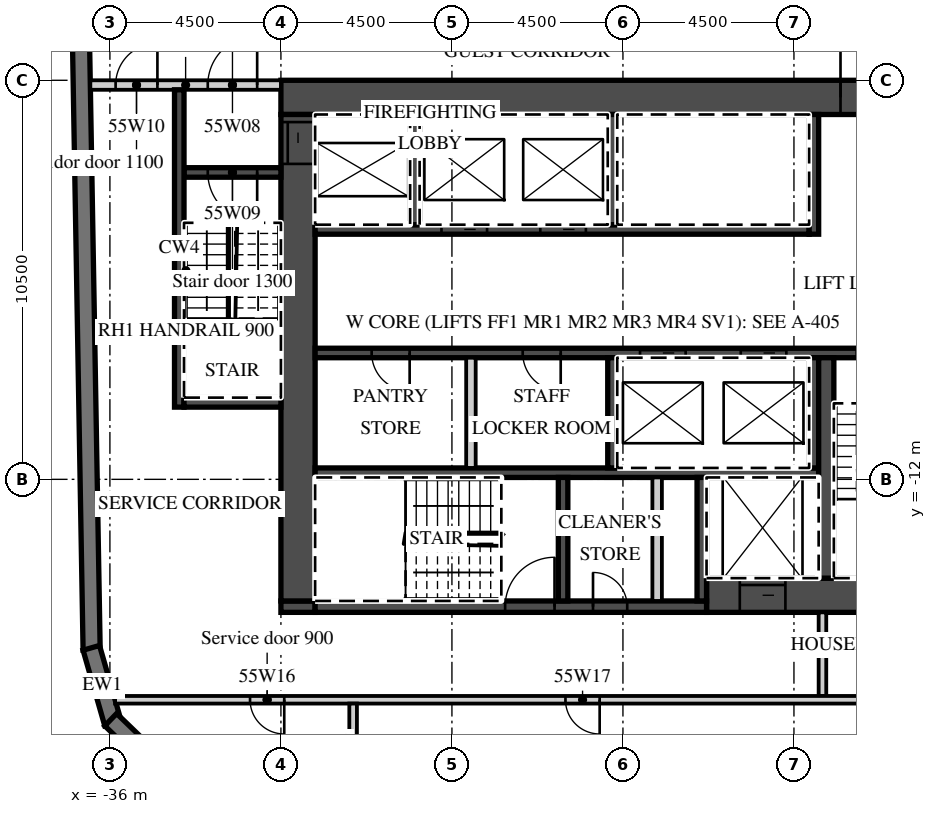
"""IFC4 building model, lengths in metres.
Left out: names, types, materials, properties, quantities, classifications, styles, units other than length and angle.
Written with IfcOpenShell. Run it as: python <this file> out.ifc"""

import sys

from ifc_helpers import new_model, si_unit, direction, frame, frame_2d, origin, place, context, subcontext, project, spatial, polyline, rectangle, outline, extrude, element, fill, save


model = new_model("IFC4")
c1 = context("Model", 3, precision=1e-05, world=origin(), true_north=direction((0.0, 1.0)))
c2 = subcontext(c1, "Body", "Model", "MODEL_VIEW")
j1 = project(units=[si_unit("LENGTHUNIT", "METRE"), si_unit("PLANEANGLEUNIT", "RADIAN")], contexts=[c1])
p1 = place(None, origin())
s1 = spatial("IfcSite", under=j1, at=p1, CompositionType="ELEMENT")
p2 = place(p1, origin())
s2 = spatial("IfcBuilding", under=s1, at=p2, CompositionType="ELEMENT")
p3 = place(p2, frame((0.0, 0.0, 227.6)))
s3 = spatial("IfcBuildingStorey", under=s2, at=p3, CompositionType="ELEMENT", Elevation=227.6)
p4 = place(p3, frame((-37.057, 16.503, 0.0), z_axis=(0.0, 0.0, 1.0), x_axis=(0.017452279857, -0.999847697366, 0.0)))
e1 = element("IfcWall", 1, at=p4, inside=s3, PredefinedType="SOLIDWALL", context=c2, shape_type="SweptSolid", body=[
    extrude(rectangle(XDim=33.0, YDim=0.45, at=frame_2d((16.5, 0.0))), origin(), (0.0, 0.0, 1.0), 3.02),
])
p5 = place(p3, frame((-36.49, -16.434, 0.0), z_axis=(0.0, 0.0, 1.0), x_axis=(0.275577603096, -0.961278827745, 0.0)))
e2 = element("IfcWall", 2, at=p5, inside=s3, PredefinedType="SOLIDWALL", context=c2, shape_type="SweptSolid", body=[
    extrude(outline(polyline([(0.0, -0.225), (2.071, -0.225), (1.95, 0.225), (0.121, 0.225), (0.0, -0.225)])), origin(), (0.0, 0.0, 1.0), 3.02),
])
p6 = place(p3, frame((-35.979, -18.324, 0.0), z_axis=(0.0, 0.0, 1.0), x_axis=(0.719320193998, -0.694678672846, 0.0)))
e3 = element("IfcWall", 3, at=p6, inside=s3, PredefinedType="SOLIDWALL", context=c2, shape_type="SweptSolid", body=[
    extrude(outline(polyline([(0.0, -0.225), (2.071, -0.225), (1.95, 0.225), (0.121, 0.225), (0.0, -0.225)])), origin(), (0.0, 0.0, 1.0), 3.02),
])
p7 = place(p3, frame((-31.5, -1.95, 0.0), z_axis=(0.0, 0.0, 1.0), x_axis=(1.0, 0.0, 0.0)))
e4 = element("IfcWall", 4, at=p7, inside=s3, PredefinedType="SHEAR", context=c2, shape_type="SweptSolid", body=[
    extrude(rectangle(XDim=18.0, YDim=0.9, at=frame_2d((9.0, 0.0))), origin(), (0.0, 0.0, 1.0), 3.02),
])
p8 = place(p7, frame((14.725, 0.0, 0.0)))
e5 = element("IfcOpeningElement", 5, at=p8, cuts=e4, PredefinedType="OPENING", context=c2, shape_type="SweptSolid", body=[
    extrude(rectangle(XDim=1.8, YDim=2.1, at=frame_2d((0.9, 1.05))), frame((0.0, 0.46, 0.0), z_axis=(0.0, -1.0, 0.0), x_axis=(1.0, 0.0, 0.0)), (0.0, 0.0, 1.0), 0.92),
])
p9 = place(p3, frame((-20.3, -15.05, 0.0), z_axis=(0.0, 0.0, 1.0), x_axis=(1.0, 0.0, 0.0)))
e6 = element("IfcWall", 6, at=p9, inside=s3, PredefinedType="SHEAR", context=c2, shape_type="SweptSolid", body=[
    extrude(rectangle(XDim=6.8, YDim=0.9, at=frame_2d((3.4, 0.0))), origin(), (0.0, 0.0, 1.0), 3.02),
])
p10 = place(p9, frame((0.875, 0.0, 0.0)))
e7 = element("IfcOpeningElement", 7, at=p10, cuts=e6, PredefinedType="OPENING", context=c2, shape_type="SweptSolid", body=[
    extrude(rectangle(XDim=1.2, YDim=2.1, at=frame_2d((0.6, 1.05))), frame((0.0, 0.46, 0.0), z_axis=(0.0, -1.0, 0.0), x_axis=(1.0, 0.0, 0.0)), (0.0, 0.0, 1.0), 0.92),
])
p11 = place(p3, frame((-31.5, -15.35, 0.0), z_axis=(0.0, 0.0, 1.0), x_axis=(1.0, 0.0, 0.0)))
e8 = element("IfcWall", 8, at=p11, inside=s3, PredefinedType="SHEAR", context=c2, shape_type="SweptSolid", body=[
    extrude(rectangle(XDim=0.9, YDim=0.3, at=frame_2d((0.45, 0.0))), origin(), (0.0, 0.0, 1.0), 3.02),
])
p12 = place(p3, frame((-30.6, -15.35, 0.0), z_axis=(0.0, 0.0, 1.0), x_axis=(1.0, 0.0, 0.0)))
e9 = element("IfcWall", 9, at=p12, inside=s3, PredefinedType="SHEAR", context=c2, shape_type="SweptSolid", body=[
    extrude(rectangle(XDim=10.3, YDim=0.3, at=frame_2d((5.15, 0.0))), origin(), (0.0, 0.0, 1.0), 3.02),
])
p13 = place(p12, frame((5.0, 0.0, 0.0)))
e10 = element("IfcOpeningElement", 10, at=p13, cuts=e9, PredefinedType="OPENING", context=c2, shape_type="SweptSolid", body=[
    extrude(rectangle(XDim=1.3, YDim=2.1, at=frame_2d((0.65, 1.05))), frame((0.0, 0.16, 0.0), z_axis=(0.0, -1.0, 0.0), x_axis=(1.0, 0.0, 0.0)), (0.0, 0.0, 1.0), 0.32),
])
p14 = place(p12, frame((7.312, 0.0, 0.0)))
e11 = element("IfcOpeningElement", 11, at=p14, cuts=e9, PredefinedType="OPENING", context=c2, shape_type="SweptSolid", body=[
    extrude(rectangle(XDim=0.9, YDim=2.1, at=frame_2d((0.45, 1.05))), frame((0.0, 0.16, 0.0), z_axis=(0.0, -1.0, 0.0), x_axis=(1.0, 0.0, 0.0)), (0.0, 0.0, 1.0), 0.32),
])
p15 = place(p3, frame((-31.05, -15.2, 0.0), z_axis=(0.0, 0.0, 1.0), x_axis=(0.0, 1.0, 0.0)))
e12 = element("IfcWall", 12, at=p15, inside=s3, PredefinedType="SHEAR", context=c2, shape_type="SweptSolid", body=[
    extrude(rectangle(XDim=12.8, YDim=0.9, at=frame_2d((6.4, 0.0))), origin(), (0.0, 0.0, 1.0), 3.02),
])
p16 = place(p15, frame((11.5, 0.0, 0.0)))
e13 = element("IfcOpeningElement", 13, at=p16, cuts=e12, PredefinedType="OPENING", context=c2, shape_type="SweptSolid", body=[
    extrude(rectangle(XDim=1.1, YDim=2.1, at=frame_2d((0.55, 1.05))), frame((0.0, 0.46, 0.0), z_axis=(0.0, -1.0, 0.0), x_axis=(1.0, 0.0, 0.0)), (0.0, 0.0, 1.0), 0.92),
])
p17 = place(p3, frame((-30.6, -5.425, 0.0), z_axis=(0.0, 0.0, 1.0), x_axis=(1.0, 0.0, 0.0)))
e14 = element("IfcWall", 14, at=p17, inside=s3, PredefinedType="SHEAR", context=c2, shape_type="SweptSolid", body=[
    extrude(rectangle(XDim=13.0, YDim=0.25, at=frame_2d((6.5, 0.0))), origin(), (0.0, 0.0, 1.0), 3.02),
])
p18 = place(p17, frame((3.325, 0.0, 0.0)))
e15 = element("IfcOpeningElement", 15, at=p18, cuts=e14, PredefinedType="OPENING", context=c2, shape_type="SweptSolid", body=[
    extrude(rectangle(XDim=1.2, YDim=2.1, at=frame_2d((0.6, 1.05))), frame((0.0, 0.135, 0.0), z_axis=(0.0, -1.0, 0.0), x_axis=(1.0, 0.0, 0.0)), (0.0, 0.0, 1.0), 0.27),
])
p19 = place(p17, frame((5.925, 0.0, 0.0)))
e16 = element("IfcOpeningElement", 16, at=p19, cuts=e14, PredefinedType="OPENING", context=c2, shape_type="SweptSolid", body=[
    extrude(rectangle(XDim=1.2, YDim=2.1, at=frame_2d((0.6, 1.05))), frame((0.0, 0.135, 0.0), z_axis=(0.0, -1.0, 0.0), x_axis=(1.0, 0.0, 0.0)), (0.0, 0.0, 1.0), 0.27),
])
p20 = place(p3, frame((-17.475, -5.55, 0.0), z_axis=(0.0, 0.0, 1.0), x_axis=(0.0, 1.0, 0.0)))
e17 = element("IfcWall", 17, at=p20, inside=s3, PredefinedType="SHEAR", context=c2, shape_type="SweptSolid", body=[
    extrude(rectangle(XDim=3.15, YDim=0.25, at=frame_2d((1.575, 0.0))), origin(), (0.0, 0.0, 1.0), 3.02),
])
for number, where, z_axis, x_axis in (
    (18, (-27.975, -5.3, 0.0), (0.0, 0.0, 1.0), (0.0, 1.0, 0.0)),
    (19, (-22.775, -5.3, 0.0), (0.0, 0.0, 1.0), (0.0, 1.0, 0.0)),
):
    element("IfcWall", number, at=place(p3, frame(where, z_axis=z_axis, x_axis=x_axis)), inside=s3, PredefinedType="SHEAR", context=c2, shape_type="SweptSolid", body=[
        extrude(rectangle(XDim=2.9, YDim=0.25, at=frame_2d((1.45, 0.0))), origin(), (0.0, 0.0, 1.0), 3.02),
    ])
p21 = place(p3, frame((-30.6, -8.675, 0.0), z_axis=(0.0, 0.0, 1.0), x_axis=(1.0, 0.0, 0.0)))
e20 = element("IfcWall", 20, at=p21, inside=s3, PredefinedType="SHEAR", context=c2, shape_type="SweptSolid", body=[
    extrude(rectangle(XDim=16.2, YDim=0.25, at=frame_2d((8.1, 0.0))), origin(), (0.0, 0.0, 1.0), 3.02),
])
p22 = place(p21, frame((8.55, 0.0, 0.0)))
e21 = element("IfcOpeningElement", 21, at=p22, cuts=e20, PredefinedType="OPENING", context=c2, shape_type="SweptSolid", body=[
    extrude(rectangle(XDim=1.2, YDim=2.1, at=frame_2d((0.6, 1.05))), frame((0.0, 0.135, 0.0), z_axis=(0.0, -1.0, 0.0), x_axis=(1.0, 0.0, 0.0)), (0.0, 0.0, 1.0), 0.27),
])
p23 = place(p21, frame((11.2, 0.0, 0.0)))
e22 = element("IfcOpeningElement", 22, at=p23, cuts=e20, PredefinedType="OPENING", context=c2, shape_type="SweptSolid", body=[
    extrude(rectangle(XDim=1.2, YDim=2.1, at=frame_2d((0.6, 1.05))), frame((0.0, 0.135, 0.0), z_axis=(0.0, -1.0, 0.0), x_axis=(1.0, 0.0, 0.0)), (0.0, 0.0, 1.0), 0.27),
])
p24 = place(p21, frame((14.25, 0.0, 0.0)))
e23 = element("IfcOpeningElement", 23, at=p24, cuts=e20, PredefinedType="OPENING", context=c2, shape_type="SweptSolid", body=[
    extrude(rectangle(XDim=1.3, YDim=2.1, at=frame_2d((0.65, 1.05))), frame((0.0, 0.135, 0.0), z_axis=(0.0, -1.0, 0.0), x_axis=(1.0, 0.0, 0.0)), (0.0, 0.0, 1.0), 0.27),
])
p25 = place(p21, frame((1.488, 0.0, 0.0)))
e24 = element("IfcOpeningElement", 24, at=p25, cuts=e20, PredefinedType="OPENING", context=c2, shape_type="SweptSolid", body=[
    extrude(rectangle(XDim=1.0, YDim=2.1, at=frame_2d((0.5, 1.05))), frame((0.0, 0.135, 0.0), z_axis=(0.0, -1.0, 0.0), x_axis=(1.0, 0.0, 0.0)), (0.0, 0.0, 1.0), 0.27),
])
p26 = place(p21, frame((5.462, 0.0, 0.0)))
e25 = element("IfcOpeningElement", 25, at=p26, cuts=e20, PredefinedType="OPENING", context=c2, shape_type="SweptSolid", body=[
    extrude(rectangle(XDim=1.0, YDim=2.1, at=frame_2d((0.5, 1.05))), frame((0.0, 0.135, 0.0), z_axis=(0.0, -1.0, 0.0), x_axis=(1.0, 0.0, 0.0)), (0.0, 0.0, 1.0), 0.27),
])
p27 = place(p3, frame((-30.6, -11.825, 0.0), z_axis=(0.0, 0.0, 1.0), x_axis=(1.0, 0.0, 0.0)))
e26 = element("IfcWall", 26, at=p27, inside=s3, PredefinedType="SHEAR", context=c2, shape_type="SweptSolid", body=[
    extrude(rectangle(XDim=13.25, YDim=0.25, at=frame_2d((6.625, 0.0))), origin(), (0.0, 0.0, 1.0), 3.02),
])
for number, where, z_axis, x_axis in (
    (27, (-17.475, -11.7, 0.0), (0.0, 0.0, 1.0), (0.0, 1.0, 0.0)),
    (28, (-22.775, -11.7, 0.0), (0.0, 0.0, 1.0), (0.0, 1.0, 0.0)),
):
    element("IfcWall", number, at=place(p3, frame(where, z_axis=z_axis, x_axis=x_axis)), inside=s3, PredefinedType="SHEAR", context=c2, shape_type="SweptSolid", body=[
        extrude(rectangle(XDim=2.9, YDim=0.25, at=frame_2d((1.45, 0.0))), origin(), (0.0, 0.0, 1.0), 3.02),
    ])
p28 = place(p3, frame((-26.5, -11.7, 0.0), z_axis=(0.0, 0.0, 1.0), x_axis=(0.0, 1.0, 0.0)))
e29 = element("IfcWall", 29, at=p28, inside=s3, PredefinedType="PARTITIONING", context=c2, shape_type="SweptSolid", body=[
    extrude(rectangle(XDim=2.9, YDim=0.25, at=frame_2d((1.45, 0.0))), origin(), (0.0, 0.0, 1.0), 3.02),
])
p29 = place(p3, frame((-17.15, -14.6, 0.0), z_axis=(0.0, 0.0, 1.0), x_axis=(0.0, 1.0, 0.0)))
e30 = element("IfcWall", 30, at=p29, inside=s3, PredefinedType="SHEAR", context=c2, shape_type="SweptSolid", body=[
    extrude(rectangle(XDim=5.8, YDim=0.4, at=frame_2d((2.9, 0.0))), origin(), (0.0, 0.0, 1.0), 3.02),
])
for number, where, z_axis, x_axis in (
    (31, (-20.425, -15.2, 0.0), (0.0, 0.0, 1.0), (0.0, 1.0, 0.0)),
    (32, (-24.075, -15.2, 0.0), (0.0, 0.0, 1.0), (0.0, 1.0, 0.0)),
):
    element("IfcWall", number, at=place(p3, frame(where, z_axis=z_axis, x_axis=x_axis)), inside=s3, PredefinedType="SHEAR", context=c2, shape_type="SweptSolid", body=[
        extrude(rectangle(XDim=3.25, YDim=0.25, at=frame_2d((1.625, 0.0))), origin(), (0.0, 0.0, 1.0), 3.02),
    ])
p30 = place(p3, frame((-21.6, -15.2, 0.0), z_axis=(0.0, 0.0, 1.0), x_axis=(0.0, 1.0, 0.0)))
e33 = element("IfcWall", 33, at=p30, inside=s3, PredefinedType="PARTITIONING", context=c2, shape_type="SweptSolid", body=[
    extrude(rectangle(XDim=3.25, YDim=0.25, at=frame_2d((1.625, 0.0))), origin(), (0.0, 0.0, 1.0), 3.02),
])
p31 = place(p3, frame((-36.515, -1.625, 0.0), z_axis=(0.0, 0.0, 1.0), x_axis=(1.0, 0.0, 0.0)))
e34 = element("IfcWall", 34, at=p31, inside=s3, PredefinedType="PARTITIONING", context=c2, shape_type="SweptSolid", body=[
    extrude(rectangle(XDim=5.015, YDim=0.25, at=frame_2d((2.508, 0.0))), origin(), (0.0, 0.0, 1.0), 3.02),
])
p32 = place(p31, frame((3.09, 0.0, 0.0)))
e35 = element("IfcOpeningElement", 35, at=p32, cuts=e34, PredefinedType="OPENING", context=c2, shape_type="SweptSolid", body=[
    extrude(rectangle(XDim=1.3, YDim=2.1, at=frame_2d((0.65, 1.05))), frame((0.0, 0.135, 0.0), z_axis=(0.0, -1.0, 0.0), x_axis=(1.0, 0.0, 0.0)), (0.0, 0.0, 1.0), 0.27),
])
p33 = place(p31, frame((0.665, 0.0, 0.0)))
e36 = element("IfcOpeningElement", 36, at=p33, cuts=e34, PredefinedType="OPENING", context=c2, shape_type="SweptSolid", body=[
    extrude(rectangle(XDim=1.1, YDim=2.1, at=frame_2d((0.55, 1.05))), frame((0.0, 0.135, 0.0), z_axis=(0.0, -1.0, 0.0), x_axis=(1.0, 0.0, 0.0)), (0.0, 0.0, 1.0), 0.27),
])
p34 = place(p3, frame((-34.05, -3.925, 0.0), z_axis=(0.0, 0.0, 1.0), x_axis=(1.0, 0.0, 0.0)))
e37 = element("IfcWall", 37, at=p34, inside=s3, PredefinedType="SHEAR", context=c2, shape_type="SweptSolid", body=[
    extrude(rectangle(XDim=2.55, YDim=0.25, at=frame_2d((1.275, 0.0))), origin(), (0.0, 0.0, 1.0), 3.02),
])
p35 = place(p34, frame((0.625, 0.0, 0.0)))
e38 = element("IfcOpeningElement", 38, at=p35, cuts=e37, PredefinedType="OPENING", context=c2, shape_type="SweptSolid", body=[
    extrude(rectangle(XDim=1.3, YDim=2.1, at=frame_2d((0.65, 1.05))), frame((0.0, 0.135, 0.0), z_axis=(0.0, -1.0, 0.0), x_axis=(1.0, 0.0, 0.0)), (0.0, 0.0, 1.0), 0.27),
])
p36 = place(p3, frame((-34.175, -10.1, 0.0), z_axis=(0.0, 0.0, 1.0), x_axis=(0.0, 1.0, 0.0)))
e39 = element("IfcWall", 39, at=p36, inside=s3, PredefinedType="SHEAR", context=c2, shape_type="SweptSolid", body=[
    extrude(rectangle(XDim=8.35, YDim=0.25, at=frame_2d((4.175, 0.0))), origin(), (0.0, 0.0, 1.0), 3.02),
])
p37 = place(p3, frame((-34.05, -9.975, 0.0), z_axis=(0.0, 0.0, 1.0), x_axis=(1.0, 0.0, 0.0)))
e40 = element("IfcWall", 40, at=p37, inside=s3, PredefinedType="SHEAR", context=c2, shape_type="SweptSolid", body=[
    extrude(rectangle(XDim=2.55, YDim=0.25, at=frame_2d((1.275, 0.0))), origin(), (0.0, 0.0, 1.0), 3.02),
])
p38 = place(p3, frame((-17.25, -17.7, 0.0), z_axis=(0.0, 0.0, 1.0), x_axis=(0.0, 1.0, 0.0)))
e41 = element("IfcWall", 41, at=p38, inside=s3, PredefinedType="PARTITIONING", context=c2, shape_type="SweptSolid", body=[
    extrude(rectangle(XDim=2.2, YDim=0.2, at=frame_2d((1.1, 0.0))), origin(), (0.0, 0.0, 1.0), 3.02),
])
p39 = place(p3, frame((-35.864, -17.8, 0.0), z_axis=(0.0, 0.0, 1.0), x_axis=(1.0, 0.0, 0.0)))
e42 = element("IfcWall", 42, at=p39, inside=s3, PredefinedType="PARTITIONING", context=c2, shape_type="SweptSolid", body=[
    extrude(rectangle(XDim=22.264, YDim=0.2, at=frame_2d((11.132, 0.0))), origin(), (0.0, 0.0, 1.0), 3.02),
])
p40 = place(p39, frame((3.551, 0.0, 0.0)))
e43 = element("IfcOpeningElement", 43, at=p40, cuts=e42, PredefinedType="OPENING", context=c2, shape_type="SweptSolid", body=[
    extrude(rectangle(XDim=0.9, YDim=2.1, at=frame_2d((0.45, 1.05))), frame((0.0, 0.11, 0.0), z_axis=(0.0, -1.0, 0.0), x_axis=(1.0, 0.0, 0.0)), (0.0, 0.0, 1.0), 0.22),
])
p41 = place(p39, frame((11.851, 0.0, 0.0)))
e44 = element("IfcOpeningElement", 44, at=p41, cuts=e42, PredefinedType="OPENING", context=c2, shape_type="SweptSolid", body=[
    extrude(rectangle(XDim=0.9, YDim=2.1, at=frame_2d((0.45, 1.05))), frame((0.0, 0.11, 0.0), z_axis=(0.0, -1.0, 0.0), x_axis=(1.0, 0.0, 0.0)), (0.0, 0.0, 1.0), 0.22),
])
p42 = place(p3, frame((-29.6, -19.922, 0.0), z_axis=(0.0, 0.0, 1.0), x_axis=(0.0, 1.0, 0.0)))
e45 = element("IfcWall", 45, at=p42, inside=s3, PredefinedType="PARTITIONING", context=c2, shape_type="SweptSolid", body=[
    extrude(rectangle(XDim=2.022, YDim=0.2, at=frame_2d((1.011, 0.0))), origin(), (0.0, 0.0, 1.0), 3.02),
])
p43 = place(p22, origin())
e46 = element("IfcDoor", 46, at=p43, inside=s3, OperationType="SLIDING_TO_LEFT", PredefinedType="DOOR", context=c2, shape_type="SweptSolid", body=[
    extrude(rectangle(XDim=1.2, YDim=2.1, at=frame_2d((0.6, 1.05))), frame((0.0, 0.025, 0.0), z_axis=(0.0, -1.0, 0.0), x_axis=(1.0, 0.0, 0.0)), (0.0, 0.0, 1.0), 0.05),
])
fill(e21, e46)
p44 = place(p23, origin())
e47 = element("IfcDoor", 47, at=p44, inside=s3, OperationType="SLIDING_TO_RIGHT", PredefinedType="DOOR", context=c2, shape_type="SweptSolid", body=[
    extrude(rectangle(XDim=1.2, YDim=2.1, at=frame_2d((0.6, 1.05))), frame((0.0, 0.025, 0.0), z_axis=(0.0, -1.0, 0.0), x_axis=(1.0, 0.0, 0.0)), (0.0, 0.0, 1.0), 0.05),
])
fill(e22, e47)
p45 = place(p18, origin())
e48 = element("IfcDoor", 48, at=p45, inside=s3, OperationType="SLIDING_TO_RIGHT", PredefinedType="DOOR", context=c2, shape_type="SweptSolid", body=[
    extrude(rectangle(XDim=1.2, YDim=2.1, at=frame_2d((0.6, 1.05))), frame((0.0, 0.025, 0.0), z_axis=(0.0, -1.0, 0.0), x_axis=(1.0, 0.0, 0.0)), (0.0, 0.0, 1.0), 0.05),
])
fill(e15, e48)
p46 = place(p19, origin())
e49 = element("IfcDoor", 49, at=p46, inside=s3, OperationType="SLIDING_TO_RIGHT", PredefinedType="DOOR", context=c2, shape_type="SweptSolid", body=[
    extrude(rectangle(XDim=1.2, YDim=2.1, at=frame_2d((0.6, 1.05))), frame((0.0, 0.025, 0.0), z_axis=(0.0, -1.0, 0.0), x_axis=(1.0, 0.0, 0.0)), (0.0, 0.0, 1.0), 0.05),
])
fill(e16, e49)
p47 = place(p10, origin())
e50 = element("IfcDoor", 50, at=p47, inside=s3, OperationType="SLIDING_TO_LEFT", PredefinedType="DOOR", context=c2, shape_type="SweptSolid", body=[
    extrude(rectangle(XDim=1.2, YDim=2.1, at=frame_2d((0.6, 1.05))), frame((0.0, 0.025, 0.0), z_axis=(0.0, -1.0, 0.0), x_axis=(1.0, 0.0, 0.0)), (0.0, 0.0, 1.0), 0.05),
])
fill(e7, e50)
p48 = place(p16, origin())
e51 = element("IfcDoor", 51, at=p48, inside=s3, OperationType="SLIDING_TO_RIGHT", PredefinedType="DOOR", context=c2, shape_type="SweptSolid", body=[
    extrude(rectangle(XDim=1.1, YDim=2.1, at=frame_2d((0.55, 1.05))), frame((0.0, 0.025, 0.0), z_axis=(0.0, -1.0, 0.0), x_axis=(1.0, 0.0, 0.0)), (0.0, 0.0, 1.0), 0.05),
])
fill(e13, e51)
p49 = place(p8, origin())
e52 = element("IfcDoor", 52, at=p49, inside=s3, OperationType="DOUBLE_DOOR_DOUBLE_SWING", PredefinedType="DOOR", context=c2, shape_type="SweptSolid", body=[
    extrude(rectangle(XDim=1.8, YDim=2.1, at=frame_2d((0.9, 1.05))), frame((0.0, 0.025, 0.0), z_axis=(0.0, -1.0, 0.0), x_axis=(1.0, 0.0, 0.0)), (0.0, 0.0, 1.0), 0.05),
])
fill(e5, e52)
p50 = place(p32, origin())
e53 = element("IfcDoor", 53, at=p50, inside=s3, OperationType="SINGLE_SWING_RIGHT", PredefinedType="DOOR", context=c2, shape_type="SweptSolid", body=[
    extrude(rectangle(XDim=1.3, YDim=2.1, at=frame_2d((0.65, 1.05))), frame((0.0, 0.025, 0.0), z_axis=(0.0, -1.0, 0.0), x_axis=(1.0, 0.0, 0.0)), (0.0, 0.0, 1.0), 0.05),
])
fill(e35, e53)
p51 = place(p35, origin())
e54 = element("IfcDoor", 54, at=p51, inside=s3, OperationType="SINGLE_SWING_RIGHT", PredefinedType="DOOR", context=c2, shape_type="SweptSolid", body=[
    extrude(rectangle(XDim=1.3, YDim=2.1, at=frame_2d((0.65, 1.05))), frame((0.0, 0.025, 0.0), z_axis=(0.0, -1.0, 0.0), x_axis=(1.0, 0.0, 0.0)), (0.0, 0.0, 1.0), 0.05),
])
fill(e38, e54)
p52 = place(p33, origin())
e55 = element("IfcDoor", 55, at=p52, inside=s3, OperationType="SINGLE_SWING_RIGHT", PredefinedType="DOOR", context=c2, shape_type="SweptSolid", body=[
    extrude(rectangle(XDim=1.1, YDim=2.1, at=frame_2d((0.55, 1.05))), frame((0.0, 0.025, 0.0), z_axis=(0.0, -1.0, 0.0), x_axis=(1.0, 0.0, 0.0)), (0.0, 0.0, 1.0), 0.05),
])
fill(e36, e55)
p53 = place(p24, origin())
e56 = element("IfcDoor", 56, at=p53, inside=s3, OperationType="SINGLE_SWING_RIGHT", PredefinedType="DOOR", context=c2, shape_type="SweptSolid", body=[
    extrude(rectangle(XDim=1.3, YDim=2.1, at=frame_2d((0.65, 1.05))), frame((0.0, 0.025, 0.0), z_axis=(0.0, -1.0, 0.0), x_axis=(1.0, 0.0, 0.0)), (0.0, 0.0, 1.0), 0.05),
])
fill(e23, e56)
p54 = place(p13, origin())
e57 = element("IfcDoor", 57, at=p54, inside=s3, OperationType="SINGLE_SWING_RIGHT", PredefinedType="DOOR", context=c2, shape_type="SweptSolid", body=[
    extrude(rectangle(XDim=1.3, YDim=2.1, at=frame_2d((0.65, 1.05))), frame((0.0, 0.025, 0.0), z_axis=(0.0, -1.0, 0.0), x_axis=(1.0, 0.0, 0.0)), (0.0, 0.0, 1.0), 0.05),
])
fill(e10, e57)
p55 = place(p14, origin())
e58 = element("IfcDoor", 58, at=p55, inside=s3, OperationType="SINGLE_SWING_LEFT", PredefinedType="DOOR", context=c2, shape_type="SweptSolid", body=[
    extrude(rectangle(XDim=0.9, YDim=2.1, at=frame_2d((0.45, 1.05))), frame((0.0, 0.025, 0.0), z_axis=(0.0, -1.0, 0.0), x_axis=(1.0, 0.0, 0.0)), (0.0, 0.0, 1.0), 0.05),
])
fill(e11, e58)
p56 = place(p25, origin())
e59 = element("IfcDoor", 59, at=p56, inside=s3, OperationType="SINGLE_SWING_RIGHT", PredefinedType="DOOR", context=c2, shape_type="SweptSolid", body=[
    extrude(rectangle(XDim=1.0, YDim=2.1, at=frame_2d((0.5, 1.05))), frame((0.0, 0.025, 0.0), z_axis=(0.0, -1.0, 0.0), x_axis=(1.0, 0.0, 0.0)), (0.0, 0.0, 1.0), 0.05),
])
fill(e24, e59)
p57 = place(p26, origin())
e60 = element("IfcDoor", 60, at=p57, inside=s3, OperationType="SINGLE_SWING_RIGHT", PredefinedType="DOOR", context=c2, shape_type="SweptSolid", body=[
    extrude(rectangle(XDim=1.0, YDim=2.1, at=frame_2d((0.5, 1.05))), frame((0.0, 0.025, 0.0), z_axis=(0.0, -1.0, 0.0), x_axis=(1.0, 0.0, 0.0)), (0.0, 0.0, 1.0), 0.05),
])
fill(e25, e60)
p58 = place(p40, origin())
e61 = element("IfcDoor", 61, at=p58, inside=s3, OperationType="SINGLE_SWING_RIGHT", PredefinedType="DOOR", context=c2, shape_type="SweptSolid", body=[
    extrude(rectangle(XDim=0.9, YDim=2.1, at=frame_2d((0.45, 1.05))), frame((0.0, 0.025, 0.0), z_axis=(0.0, -1.0, 0.0), x_axis=(1.0, 0.0, 0.0)), (0.0, 0.0, 1.0), 0.05),
])
fill(e43, e61)
p59 = place(p41, origin())
e62 = element("IfcDoor", 62, at=p59, inside=s3, OperationType="SINGLE_SWING_RIGHT", PredefinedType="DOOR", context=c2, shape_type="SweptSolid", body=[
    extrude(rectangle(XDim=0.9, YDim=2.1, at=frame_2d((0.45, 1.05))), frame((0.0, 0.025, 0.0), z_axis=(0.0, -1.0, 0.0), x_axis=(1.0, 0.0, 0.0)), (0.0, 0.0, 1.0), 0.05),
])
fill(e44, e62)
save(model, sys.argv[1])
